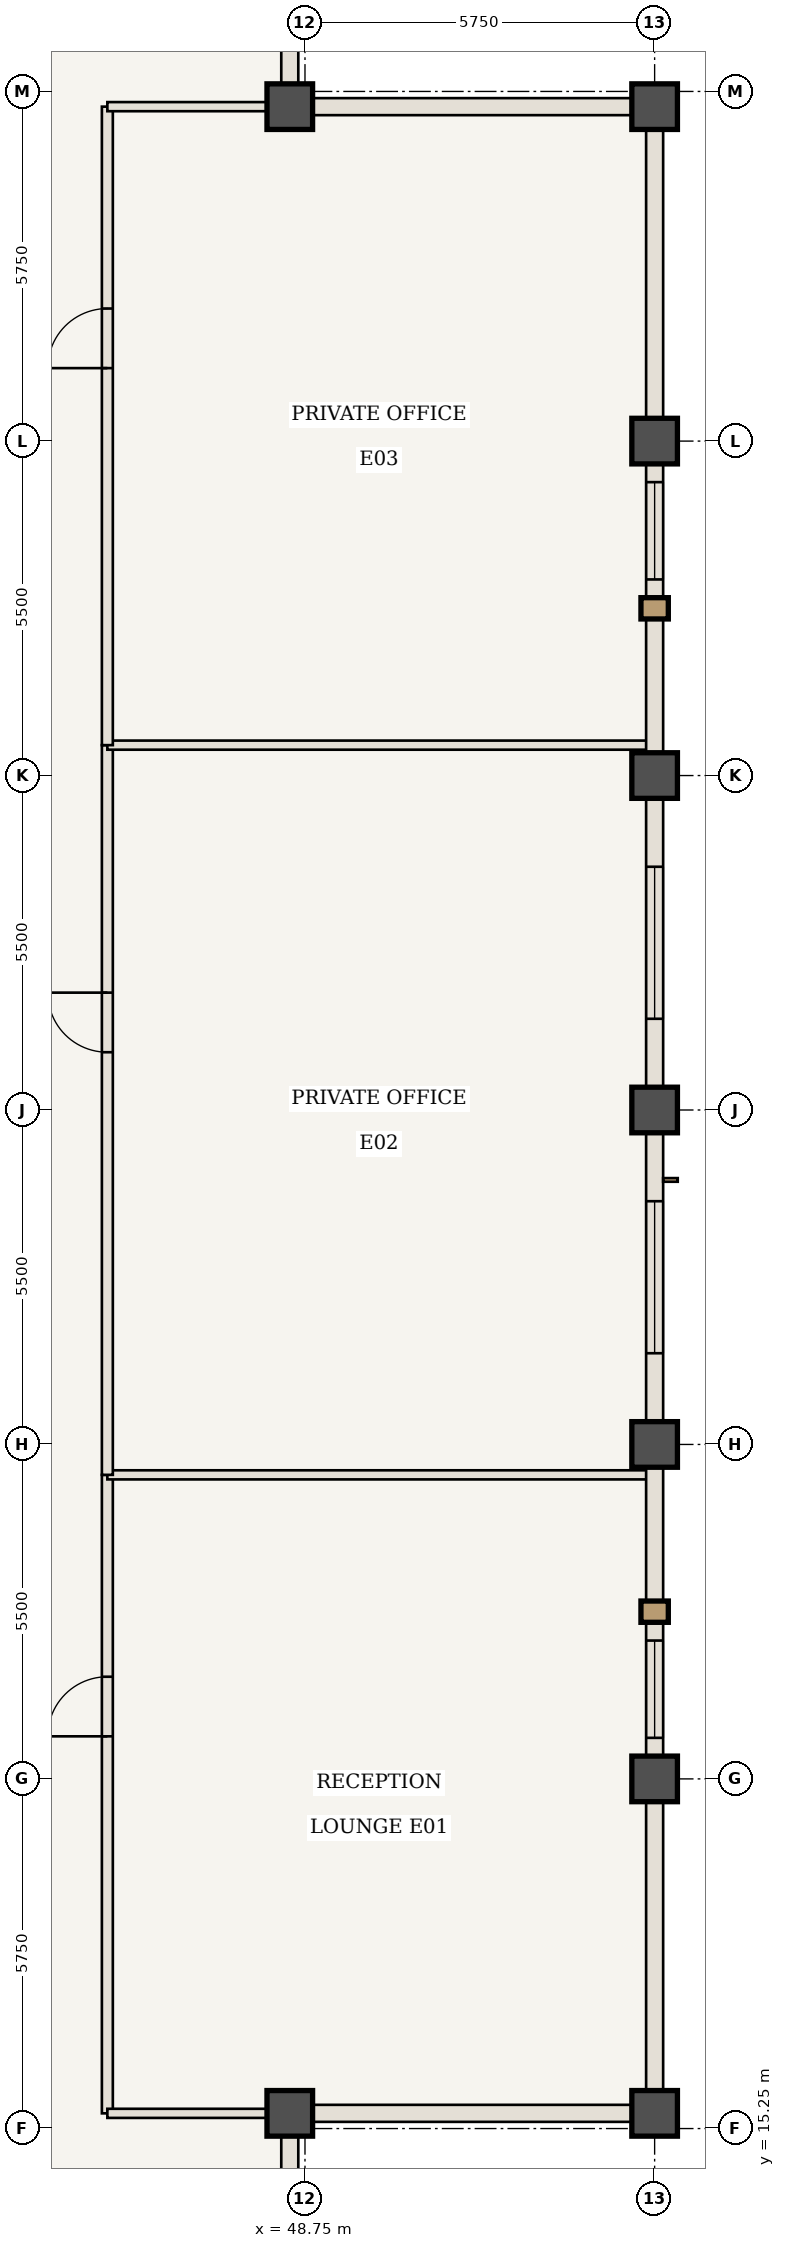
"""IFC4 building model, lengths in metres.
Left out: names, types, materials, properties, quantities, classifications, styles, units other than length and angle.
Written with IfcOpenShell. Run it as: python <this file> out.ifc"""

import sys

from ifc_helpers import new_model, si_unit, direction, frame, frame_2d, origin, origin_2d, place, context, subcontext, project, spatial, rectangle, extrude, element, fill, save


model = new_model("IFC4")
c1 = context("Model", 3, precision=1e-05, world=origin(), true_north=direction((0.0, 1.0)))
c2 = subcontext(c1, "Body", "Model", "MODEL_VIEW")
j1 = project(units=[si_unit("LENGTHUNIT", "METRE"), si_unit("PLANEANGLEUNIT", "RADIAN")], contexts=[c1])
p1 = place(None, origin())
s1 = spatial("IfcSite", under=j1, at=p1, CompositionType="ELEMENT")
p2 = place(p1, origin())
s2 = spatial("IfcBuilding", under=s1, at=p2, CompositionType="ELEMENT")
p3 = place(p2, frame((0.0, 0.0, 269.85)))
s3 = spatial("IfcBuildingStorey", under=s2, at=p3, CompositionType="ELEMENT", Elevation=269.85)
for number, where, z_axis, x_axis in (
    (1, (48.5, 15.5, 0.0), (0.0, 0.0, 1.0), (1.0, 0.0, 0.0)),
    (2, (54.5, 15.5, 0.0), (0.0, 0.0, 1.0), (1.0, 0.0, 0.0)),
    (3, (54.5, 48.5, 0.0), (0.0, 0.0, 1.0), (1.0, 0.0, 0.0)),
    (4, (48.5, 48.5, 0.0), (0.0, 0.0, 1.0), (1.0, 0.0, 0.0)),
    (5, (54.5, 21.0, 0.0), (0.0, 0.0, 1.0), (1.0, 0.0, 0.0)),
    (6, (54.5, 26.5, 0.0), (0.0, 0.0, 1.0), (1.0, 0.0, 0.0)),
    (7, (54.5, 32.0, 0.0), (0.0, 0.0, 1.0), (1.0, 0.0, 0.0)),
    (8, (54.5, 37.5, 0.0), (0.0, 0.0, 1.0), (1.0, 0.0, 0.0)),
    (9, (54.5, 43.0, 0.0), (0.0, 0.0, 1.0), (1.0, 0.0, 0.0)),
):
    element("IfcColumn", number, at=place(p3, frame(where, z_axis=z_axis, x_axis=x_axis)), inside=s3, PredefinedType="COLUMN", context=c2, shape_type="SweptSolid", body=[
        extrude(rectangle(XDim=0.75, YDim=0.75, at=origin_2d()), origin(), (0.0, 0.0, 1.0), 3.85),
    ])
p4 = place(p3, frame((45.5, 15.5, 0.0), z_axis=(0.0, 0.0, 1.0), x_axis=(0.0, 1.0, 0.0)))
e10 = element("IfcWall", 10, at=p4, inside=s3, PredefinedType="STANDARD", context=c2, shape_type="SweptSolid", body=[
    extrude(rectangle(XDim=10.5, YDim=0.18, at=frame_2d((5.25, 0.0))), origin(), (0.0, 0.0, 1.0), 3.685),
])
p5 = place(p4, frame((6.2, 0.0, 0.0)))
e11 = element("IfcOpeningElement", 11, at=p5, cuts=e10, PredefinedType="OPENING", context=c2, shape_type="SweptSolid", body=[
    extrude(rectangle(XDim=0.98, YDim=2.2, at=frame_2d((0.49, 1.1))), frame((0.0, 0.1, 0.0), z_axis=(0.0, -1.0, 0.0), x_axis=(1.0, 0.0, 0.0)), (0.0, 0.0, 1.0), 0.2),
])
p6 = place(p3, frame((45.5, 26.0, 0.0), z_axis=(0.0, 0.0, 1.0), x_axis=(1.0, 0.0, 0.0)))
e12 = element("IfcWall", 12, at=p6, inside=s3, PredefinedType="STANDARD", context=c2, shape_type="SweptSolid", body=[
    extrude(rectangle(XDim=8.94, YDim=0.15, at=frame_2d((4.47, 0.0))), origin(), (0.0, 0.0, 1.0), 3.685),
])
p7 = place(p3, frame((45.5, 26.0, 0.0), z_axis=(0.0, 0.0, 1.0), x_axis=(0.0, 1.0, 0.0)))
e13 = element("IfcWall", 13, at=p7, inside=s3, PredefinedType="STANDARD", context=c2, shape_type="SweptSolid", body=[
    extrude(rectangle(XDim=12.0, YDim=0.18, at=frame_2d((6.0, 0.0))), origin(), (0.0, 0.0, 1.0), 3.685),
])
p8 = place(p7, frame((6.95, 0.0, 0.0)))
e14 = element("IfcOpeningElement", 14, at=p8, cuts=e13, PredefinedType="OPENING", context=c2, shape_type="SweptSolid", body=[
    extrude(rectangle(XDim=0.98, YDim=2.2, at=frame_2d((0.49, 1.1))), frame((0.0, 0.1, 0.0), z_axis=(0.0, -1.0, 0.0), x_axis=(1.0, 0.0, 0.0)), (0.0, 0.0, 1.0), 0.2),
])
p9 = place(p3, frame((45.5, 38.0, 0.0), z_axis=(0.0, 0.0, 1.0), x_axis=(1.0, 0.0, 0.0)))
e15 = element("IfcWall", 15, at=p9, inside=s3, PredefinedType="STANDARD", context=c2, shape_type="SweptSolid", body=[
    extrude(rectangle(XDim=8.94, YDim=0.15, at=frame_2d((4.47, 0.0))), origin(), (0.0, 0.0, 1.0), 3.685),
])
p10 = place(p3, frame((45.5, 38.0, 0.0), z_axis=(0.0, 0.0, 1.0), x_axis=(0.0, 1.0, 0.0)))
e16 = element("IfcWall", 16, at=p10, inside=s3, PredefinedType="STANDARD", context=c2, shape_type="SweptSolid", body=[
    extrude(rectangle(XDim=10.5, YDim=0.18, at=frame_2d((5.25, 0.0))), origin(), (0.0, 0.0, 1.0), 3.685),
])
p11 = place(p10, frame((6.2, 0.0, 0.0)))
e17 = element("IfcOpeningElement", 17, at=p11, cuts=e16, PredefinedType="OPENING", context=c2, shape_type="SweptSolid", body=[
    extrude(rectangle(XDim=0.98, YDim=2.2, at=frame_2d((0.49, 1.1))), frame((0.0, 0.1, 0.0), z_axis=(0.0, -1.0, 0.0), x_axis=(1.0, 0.0, 0.0)), (0.0, 0.0, 1.0), 0.2),
])
for number, where, z_axis, x_axis in (
    (18, (45.5, 15.5, 0.0), (0.0, 0.0, 1.0), (1.0, 0.0, 0.0)),
    (19, (45.5, 48.5, 0.0), (0.0, 0.0, 1.0), (1.0, 0.0, 0.0)),
):
    element("IfcWall", number, at=place(p3, frame(where, z_axis=z_axis, x_axis=x_axis)), inside=s3, PredefinedType="STANDARD", context=c2, shape_type="SweptSolid", body=[
        extrude(rectangle(XDim=3.0, YDim=0.15, at=frame_2d((1.5, 0.0))), origin(), (0.0, 0.0, 1.0), 3.685),
    ])
p12 = place(p3, frame((54.5, 21.0, 0.0), z_axis=(0.0, 0.0, 1.0), x_axis=(0.0, -1.0, 0.0)))
e20 = element("IfcWall", 20, at=p12, inside=s3, PredefinedType="USERDEFINED", context=c2, shape_type="SweptSolid", body=[
    extrude(rectangle(XDim=5.5, YDim=0.28, at=frame_2d((2.75, 0.0))), origin(), (0.0, 0.0, 1.0), 2.985),
])
p13 = place(p3, frame((54.5, 26.5, 0.0), z_axis=(0.0, 0.0, 1.0), x_axis=(0.0, -1.0, 0.0)))
e21 = element("IfcWall", 21, at=p13, inside=s3, PredefinedType="USERDEFINED", context=c2, shape_type="SweptSolid", body=[
    extrude(rectangle(XDim=5.5, YDim=0.28, at=frame_2d((2.75, 0.0))), origin(), (0.0, 0.0, 1.0), 2.985),
])
p14 = place(p13, frame((3.225, 0.0, 0.85)))
e22 = element("IfcOpeningElement", 22, at=p14, cuts=e21, PredefinedType="OPENING", context=c2, shape_type="SweptSolid", body=[
    extrude(rectangle(XDim=1.6, YDim=1.935, at=frame_2d((0.8, 0.968))), frame((0.0, 0.15, 0.0), z_axis=(0.0, -1.0, 0.0), x_axis=(1.0, 0.0, 0.0)), (0.0, 0.0, 1.0), 0.3),
])
p15 = place(p3, frame((54.5, 32.0, 0.0), z_axis=(0.0, 0.0, 1.0), x_axis=(0.0, -1.0, 0.0)))
e23 = element("IfcWall", 23, at=p15, inside=s3, PredefinedType="USERDEFINED", context=c2, shape_type="SweptSolid", body=[
    extrude(rectangle(XDim=5.5, YDim=0.28, at=frame_2d((2.75, 0.0))), origin(), (0.0, 0.0, 1.0), 2.985),
])
p16 = place(p15, frame((1.5, 0.0, 0.85)))
e24 = element("IfcOpeningElement", 24, at=p16, cuts=e23, PredefinedType="OPENING", context=c2, shape_type="SweptSolid", body=[
    extrude(rectangle(XDim=2.5, YDim=1.935, at=frame_2d((1.25, 0.968))), frame((0.0, 0.15, 0.0), z_axis=(0.0, -1.0, 0.0), x_axis=(1.0, 0.0, 0.0)), (0.0, 0.0, 1.0), 0.3),
])
p17 = place(p3, frame((54.5, 37.5, 0.0), z_axis=(0.0, 0.0, 1.0), x_axis=(0.0, -1.0, 0.0)))
e25 = element("IfcWall", 25, at=p17, inside=s3, PredefinedType="USERDEFINED", context=c2, shape_type="SweptSolid", body=[
    extrude(rectangle(XDim=5.5, YDim=0.28, at=frame_2d((2.75, 0.0))), origin(), (0.0, 0.0, 1.0), 2.985),
])
p18 = place(p17, frame((1.5, 0.0, 0.85)))
e26 = element("IfcOpeningElement", 26, at=p18, cuts=e25, PredefinedType="OPENING", context=c2, shape_type="SweptSolid", body=[
    extrude(rectangle(XDim=2.5, YDim=1.935, at=frame_2d((1.25, 0.968))), frame((0.0, 0.15, 0.0), z_axis=(0.0, -1.0, 0.0), x_axis=(1.0, 0.0, 0.0)), (0.0, 0.0, 1.0), 0.3),
])
p19 = place(p3, frame((54.5, 43.0, 0.0), z_axis=(0.0, 0.0, 1.0), x_axis=(0.0, -1.0, 0.0)))
e27 = element("IfcWall", 27, at=p19, inside=s3, PredefinedType="USERDEFINED", context=c2, shape_type="SweptSolid", body=[
    extrude(rectangle(XDim=5.5, YDim=0.28, at=frame_2d((2.75, 0.0))), origin(), (0.0, 0.0, 1.0), 2.985),
])
p20 = place(p19, frame((0.675, 0.0, 0.85)))
e28 = element("IfcOpeningElement", 28, at=p20, cuts=e27, PredefinedType="OPENING", context=c2, shape_type="SweptSolid", body=[
    extrude(rectangle(XDim=1.6, YDim=1.935, at=frame_2d((0.8, 0.968))), frame((0.0, 0.15, 0.0), z_axis=(0.0, -1.0, 0.0), x_axis=(1.0, 0.0, 0.0)), (0.0, 0.0, 1.0), 0.3),
])
p21 = place(p3, frame((54.5, 48.5, 0.0), z_axis=(0.0, 0.0, 1.0), x_axis=(0.0, -1.0, 0.0)))
e29 = element("IfcWall", 29, at=p21, inside=s3, PredefinedType="USERDEFINED", context=c2, shape_type="SweptSolid", body=[
    extrude(rectangle(XDim=5.5, YDim=0.28, at=frame_2d((2.75, 0.0))), origin(), (0.0, 0.0, 1.0), 2.985),
])
for number, where, z_axis, x_axis in (
    (30, (48.5, 15.5, 0.0), (0.0, 0.0, 1.0), (0.0, -1.0, 0.0)),
    (31, (54.5, 15.5, 0.0), (0.0, 0.0, 1.0), (-1.0, 0.0, 0.0)),
    (32, (48.5, 48.5, 0.0), (0.0, 0.0, 1.0), (1.0, 0.0, 0.0)),
    (33, (48.5, 54.5, 0.0), (0.0, 0.0, 1.0), (0.0, -1.0, 0.0)),
):
    element("IfcWall", number, at=place(p3, frame(where, z_axis=z_axis, x_axis=x_axis)), inside=s3, PredefinedType="USERDEFINED", context=c2, shape_type="SweptSolid", body=[
        extrude(rectangle(XDim=6.0, YDim=0.28, at=frame_2d((3.0, 0.0))), origin(), (0.0, 0.0, 1.0), 2.985),
    ])
p22 = place(p5, origin())
e34 = element("IfcDoor", 34, at=p22, inside=s3, OperationType="SINGLE_SWING_LEFT", PredefinedType="DOOR", context=c2, shape_type="SweptSolid", body=[
    extrude(rectangle(XDim=0.98, YDim=2.2, at=frame_2d((0.49, 1.1))), frame((0.0, 0.025, 0.0), z_axis=(0.0, -1.0, 0.0), x_axis=(1.0, 0.0, 0.0)), (0.0, 0.0, 1.0), 0.05),
])
fill(e11, e34)
p23 = place(p8, origin())
e35 = element("IfcDoor", 35, at=p23, inside=s3, OperationType="SINGLE_SWING_RIGHT", PredefinedType="DOOR", context=c2, shape_type="SweptSolid", body=[
    extrude(rectangle(XDim=0.98, YDim=2.2, at=frame_2d((0.49, 1.1))), frame((0.0, 0.025, 0.0), z_axis=(0.0, -1.0, 0.0), x_axis=(1.0, 0.0, 0.0)), (0.0, 0.0, 1.0), 0.05),
])
fill(e14, e35)
p24 = place(p11, origin())
e36 = element("IfcDoor", 36, at=p24, inside=s3, OperationType="SINGLE_SWING_LEFT", PredefinedType="DOOR", context=c2, shape_type="SweptSolid", body=[
    extrude(rectangle(XDim=0.98, YDim=2.2, at=frame_2d((0.49, 1.1))), frame((0.0, 0.025, 0.0), z_axis=(0.0, -1.0, 0.0), x_axis=(1.0, 0.0, 0.0)), (0.0, 0.0, 1.0), 0.05),
])
fill(e17, e36)
p25 = place(p14, origin())
e37 = element("IfcWindow", 37, at=p25, inside=s3, PartitioningType="SINGLE_PANEL", PredefinedType="WINDOW", context=c2, shape_type="SweptSolid", body=[
    extrude(rectangle(XDim=1.6, YDim=1.935, at=frame_2d((0.8, 0.968))), frame((0.0, 0.03, 0.0), z_axis=(0.0, -1.0, 0.0), x_axis=(1.0, 0.0, 0.0)), (0.0, 0.0, 1.0), 0.06),
])
fill(e22, e37)
p26 = place(p16, origin())
e38 = element("IfcWindow", 38, at=p26, inside=s3, PartitioningType="SINGLE_PANEL", PredefinedType="WINDOW", context=c2, shape_type="SweptSolid", body=[
    extrude(rectangle(XDim=2.5, YDim=1.935, at=frame_2d((1.25, 0.968))), frame((0.0, 0.03, 0.0), z_axis=(0.0, -1.0, 0.0), x_axis=(1.0, 0.0, 0.0)), (0.0, 0.0, 1.0), 0.06),
])
fill(e24, e38)
p27 = place(p18, origin())
e39 = element("IfcWindow", 39, at=p27, inside=s3, PartitioningType="SINGLE_PANEL", PredefinedType="WINDOW", context=c2, shape_type="SweptSolid", body=[
    extrude(rectangle(XDim=2.5, YDim=1.935, at=frame_2d((1.25, 0.968))), frame((0.0, 0.03, 0.0), z_axis=(0.0, -1.0, 0.0), x_axis=(1.0, 0.0, 0.0)), (0.0, 0.0, 1.0), 0.06),
])
fill(e26, e39)
p28 = place(p20, origin())
e40 = element("IfcWindow", 40, at=p28, inside=s3, PartitioningType="SINGLE_PANEL", PredefinedType="WINDOW", context=c2, shape_type="SweptSolid", body=[
    extrude(rectangle(XDim=1.6, YDim=1.935, at=frame_2d((0.8, 0.968))), frame((0.0, 0.03, 0.0), z_axis=(0.0, -1.0, 0.0), x_axis=(1.0, 0.0, 0.0)), (0.0, 0.0, 1.0), 0.06),
])
fill(e28, e40)
save(model, sys.argv[1])
